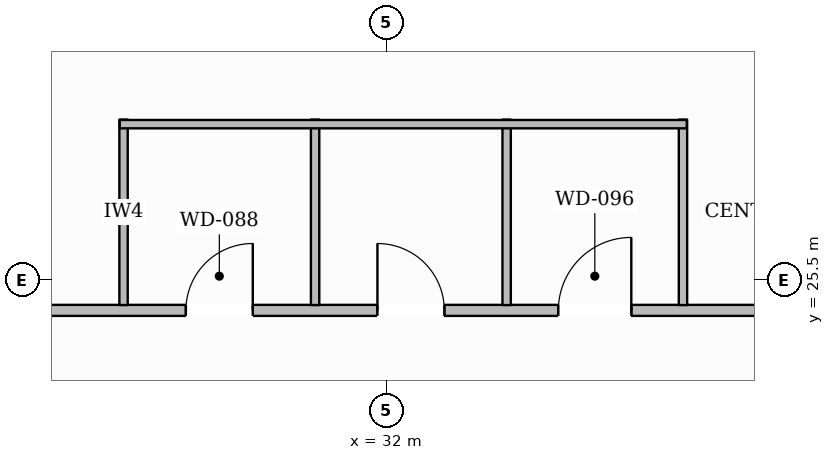
"""IFC4 building model, lengths in metres.
Left out: names, types, materials, properties, quantities, classifications, styles, units other than length and angle.
Written with IfcOpenShell. Run it as: python <this file> out.ifc"""

import sys

from ifc_helpers import new_model, si_unit, direction, frame, frame_2d, origin, place, context, subcontext, project, spatial, rectangle, extrude, element, fill, save


model = new_model("IFC4")
c1 = context("Model", 3, precision=1e-05, world=origin(), true_north=direction((0.0, 1.0)))
c2 = subcontext(c1, "Body", "Model", "MODEL_VIEW")
j1 = project(units=[si_unit("LENGTHUNIT", "METRE"), si_unit("PLANEANGLEUNIT", "RADIAN")], contexts=[c1])
p1 = place(None, origin())
s1 = spatial("IfcSite", under=j1, at=p1, CompositionType="ELEMENT")
p2 = place(p1, origin())
s2 = spatial("IfcBuilding", under=s1, at=p2, CompositionType="ELEMENT")
p3 = place(p2, frame((0.0, 0.0, 36.8)))
s3 = spatial("IfcBuildingStorey", under=s2, at=p3, CompositionType="ELEMENT", Elevation=36.8)
p4 = place(p3, frame((13.343, 14.75, 0.0), z_axis=(0.0, 0.0, 1.0), x_axis=(0.495088404126, 0.868842604906, 0.0)))
e1 = element("IfcWall", 1, at=p4, inside=s3, PredefinedType="STANDARD", context=c2, shape_type="SweptSolid", body=[
    extrude(rectangle(XDim=34.399, YDim=0.38, at=frame_2d((17.2, 0.0))), origin(), (0.0, 0.0, 1.0), 2.97),
])
p5 = place(p4, frame((30.307, 0.0, 0.65)))
e2 = element("IfcOpeningElement", 2, at=p5, cuts=e1, PredefinedType="OPENING", context=c2, shape_type="SweptSolid", body=[
    extrude(rectangle(XDim=1.65, YDim=1.75, at=frame_2d((0.825, 0.875))), frame((0.0, 0.2, 0.0), z_axis=(0.0, -1.0, 0.0), x_axis=(1.0, 0.0, 0.0)), (0.0, 0.0, 1.0), 0.4),
])
p6 = place(p4, frame((24.733, 0.0, 0.65)))
e3 = element("IfcOpeningElement", 3, at=p6, cuts=e1, PredefinedType="OPENING", context=c2, shape_type="SweptSolid", body=[
    extrude(rectangle(XDim=1.65, YDim=1.75, at=frame_2d((0.825, 0.875))), frame((0.0, 0.2, 0.0), z_axis=(0.0, -1.0, 0.0), x_axis=(1.0, 0.0, 0.0)), (0.0, 0.0, 1.0), 0.4),
])
p7 = place(p4, frame((13.585, 0.0, 0.65)))
e4 = element("IfcOpeningElement", 4, at=p7, cuts=e1, PredefinedType="OPENING", context=c2, shape_type="SweptSolid", body=[
    extrude(rectangle(XDim=1.65, YDim=1.75, at=frame_2d((0.825, 0.875))), frame((0.0, 0.2, 0.0), z_axis=(0.0, -1.0, 0.0), x_axis=(1.0, 0.0, 0.0)), (0.0, 0.0, 1.0), 0.4),
])
p8 = place(p4, frame((8.011, 0.0, 0.65)))
e5 = element("IfcOpeningElement", 5, at=p8, cuts=e1, PredefinedType="OPENING", context=c2, shape_type="SweptSolid", body=[
    extrude(rectangle(XDim=1.65, YDim=1.75, at=frame_2d((0.825, 0.875))), frame((0.0, 0.2, 0.0), z_axis=(0.0, -1.0, 0.0), x_axis=(1.0, 0.0, 0.0)), (0.0, 0.0, 1.0), 0.4),
])
p9 = place(p4, frame((2.437, 0.0, 0.65)))
e6 = element("IfcOpeningElement", 6, at=p9, cuts=e1, PredefinedType="OPENING", context=c2, shape_type="SweptSolid", body=[
    extrude(rectangle(XDim=1.65, YDim=1.75, at=frame_2d((0.825, 0.875))), frame((0.0, 0.2, 0.0), z_axis=(0.0, -1.0, 0.0), x_axis=(1.0, 0.0, 0.0)), (0.0, 0.0, 1.0), 0.4),
])
p10 = place(p3, frame((25.98, 25.1, 0.0), z_axis=(0.0, 0.0, 1.0), x_axis=(1.0, 0.0, 0.0)))
e7 = element("IfcWall", 7, at=p10, inside=s3, PredefinedType="PARTITIONING", context=c2, shape_type="SweptSolid", body=[
    extrude(rectangle(XDim=11.02, YDim=0.145, at=frame_2d((5.51, 0.0))), origin(), (0.0, 0.0, 1.0), 3.59),
])
p11 = place(p10, frame((3.38, 0.0, 0.0)))
e8 = element("IfcOpeningElement", 8, at=p11, cuts=e7, PredefinedType="OPENING", context=c2, shape_type="SweptSolid", body=[
    extrude(rectangle(XDim=0.88, YDim=2.1, at=frame_2d((0.44, 1.05))), frame((0.0, 0.083, 0.0), z_axis=(0.0, -1.0, 0.0), x_axis=(1.0, 0.0, 0.0)), (0.0, 0.0, 1.0), 0.165),
])
p12 = place(p10, frame((5.9, 0.0, 0.0)))
e9 = element("IfcOpeningElement", 9, at=p12, cuts=e7, PredefinedType="OPENING", context=c2, shape_type="SweptSolid", body=[
    extrude(rectangle(XDim=0.88, YDim=2.1, at=frame_2d((0.44, 1.05))), frame((0.0, 0.083, 0.0), z_axis=(0.0, -1.0, 0.0), x_axis=(1.0, 0.0, 0.0)), (0.0, 0.0, 1.0), 0.165),
])
p13 = place(p10, frame((8.28, 0.0, 0.0)))
e10 = element("IfcOpeningElement", 10, at=p13, cuts=e7, PredefinedType="OPENING", context=c2, shape_type="SweptSolid", body=[
    extrude(rectangle(XDim=0.96, YDim=2.1, at=frame_2d((0.48, 1.05))), frame((0.0, 0.083, 0.0), z_axis=(0.0, -1.0, 0.0), x_axis=(1.0, 0.0, 0.0)), (0.0, 0.0, 1.0), 0.165),
])
for number, where, z_axis, x_axis in (
    (11, (28.54, 25.17, 0.0), (0.0, 0.0, 1.0), (0.0, 1.0, 0.0)),
    (12, (31.06, 25.17, 0.0), (0.0, 0.0, 1.0), (0.0, 1.0, 0.0)),
    (13, (33.58, 25.17, 0.0), (0.0, 0.0, 1.0), (0.0, 1.0, 0.0)),
    (14, (35.9, 25.17, 0.0), (0.0, 0.0, 1.0), (0.0, 1.0, 0.0)),
):
    element("IfcWall", number, at=place(p3, frame(where, z_axis=z_axis, x_axis=x_axis)), inside=s3, PredefinedType="PLUMBINGWALL", context=c2, shape_type="SweptSolid", body=[
        extrude(rectangle(XDim=2.44, YDim=0.11, at=frame_2d((1.22, 0.0))), origin(), (0.0, 0.0, 1.0), 3.59),
    ])
p14 = place(p3, frame((28.49, 27.55, 0.0), z_axis=(0.0, 0.0, 1.0), x_axis=(1.0, 0.0, 0.0)))
e15 = element("IfcWall", 15, at=p14, inside=s3, PredefinedType="PLUMBINGWALL", context=c2, shape_type="SweptSolid", body=[
    extrude(rectangle(XDim=7.46, YDim=0.11, at=frame_2d((3.73, 0.0))), origin(), (0.0, 0.0, 1.0), 3.59),
])
p15 = place(p11, origin())
e16 = element("IfcDoor", 16, at=p15, inside=s3, OperationType="SINGLE_SWING_RIGHT", PredefinedType="DOOR", context=c2, shape_type="SweptSolid", body=[
    extrude(rectangle(XDim=0.88, YDim=2.1, at=frame_2d((0.44, 1.05))), frame((0.0, 0.025, 0.0), z_axis=(0.0, -1.0, 0.0), x_axis=(1.0, 0.0, 0.0)), (0.0, 0.0, 1.0), 0.05),
])
fill(e8, e16)
p16 = place(p12, origin())
e17 = element("IfcDoor", 17, at=p16, inside=s3, OperationType="SINGLE_SWING_LEFT", PredefinedType="DOOR", context=c2, shape_type="SweptSolid", body=[
    extrude(rectangle(XDim=0.88, YDim=2.1, at=frame_2d((0.44, 1.05))), frame((0.0, 0.025, 0.0), z_axis=(0.0, -1.0, 0.0), x_axis=(1.0, 0.0, 0.0)), (0.0, 0.0, 1.0), 0.05),
])
fill(e9, e17)
p17 = place(p13, origin())
e18 = element("IfcDoor", 18, at=p17, inside=s3, OperationType="SINGLE_SWING_RIGHT", PredefinedType="DOOR", context=c2, shape_type="SweptSolid", body=[
    extrude(rectangle(XDim=0.96, YDim=2.1, at=frame_2d((0.48, 1.05))), frame((0.0, 0.025, 0.0), z_axis=(0.0, -1.0, 0.0), x_axis=(1.0, 0.0, 0.0)), (0.0, 0.0, 1.0), 0.05),
])
fill(e10, e18)
save(model, sys.argv[1])
